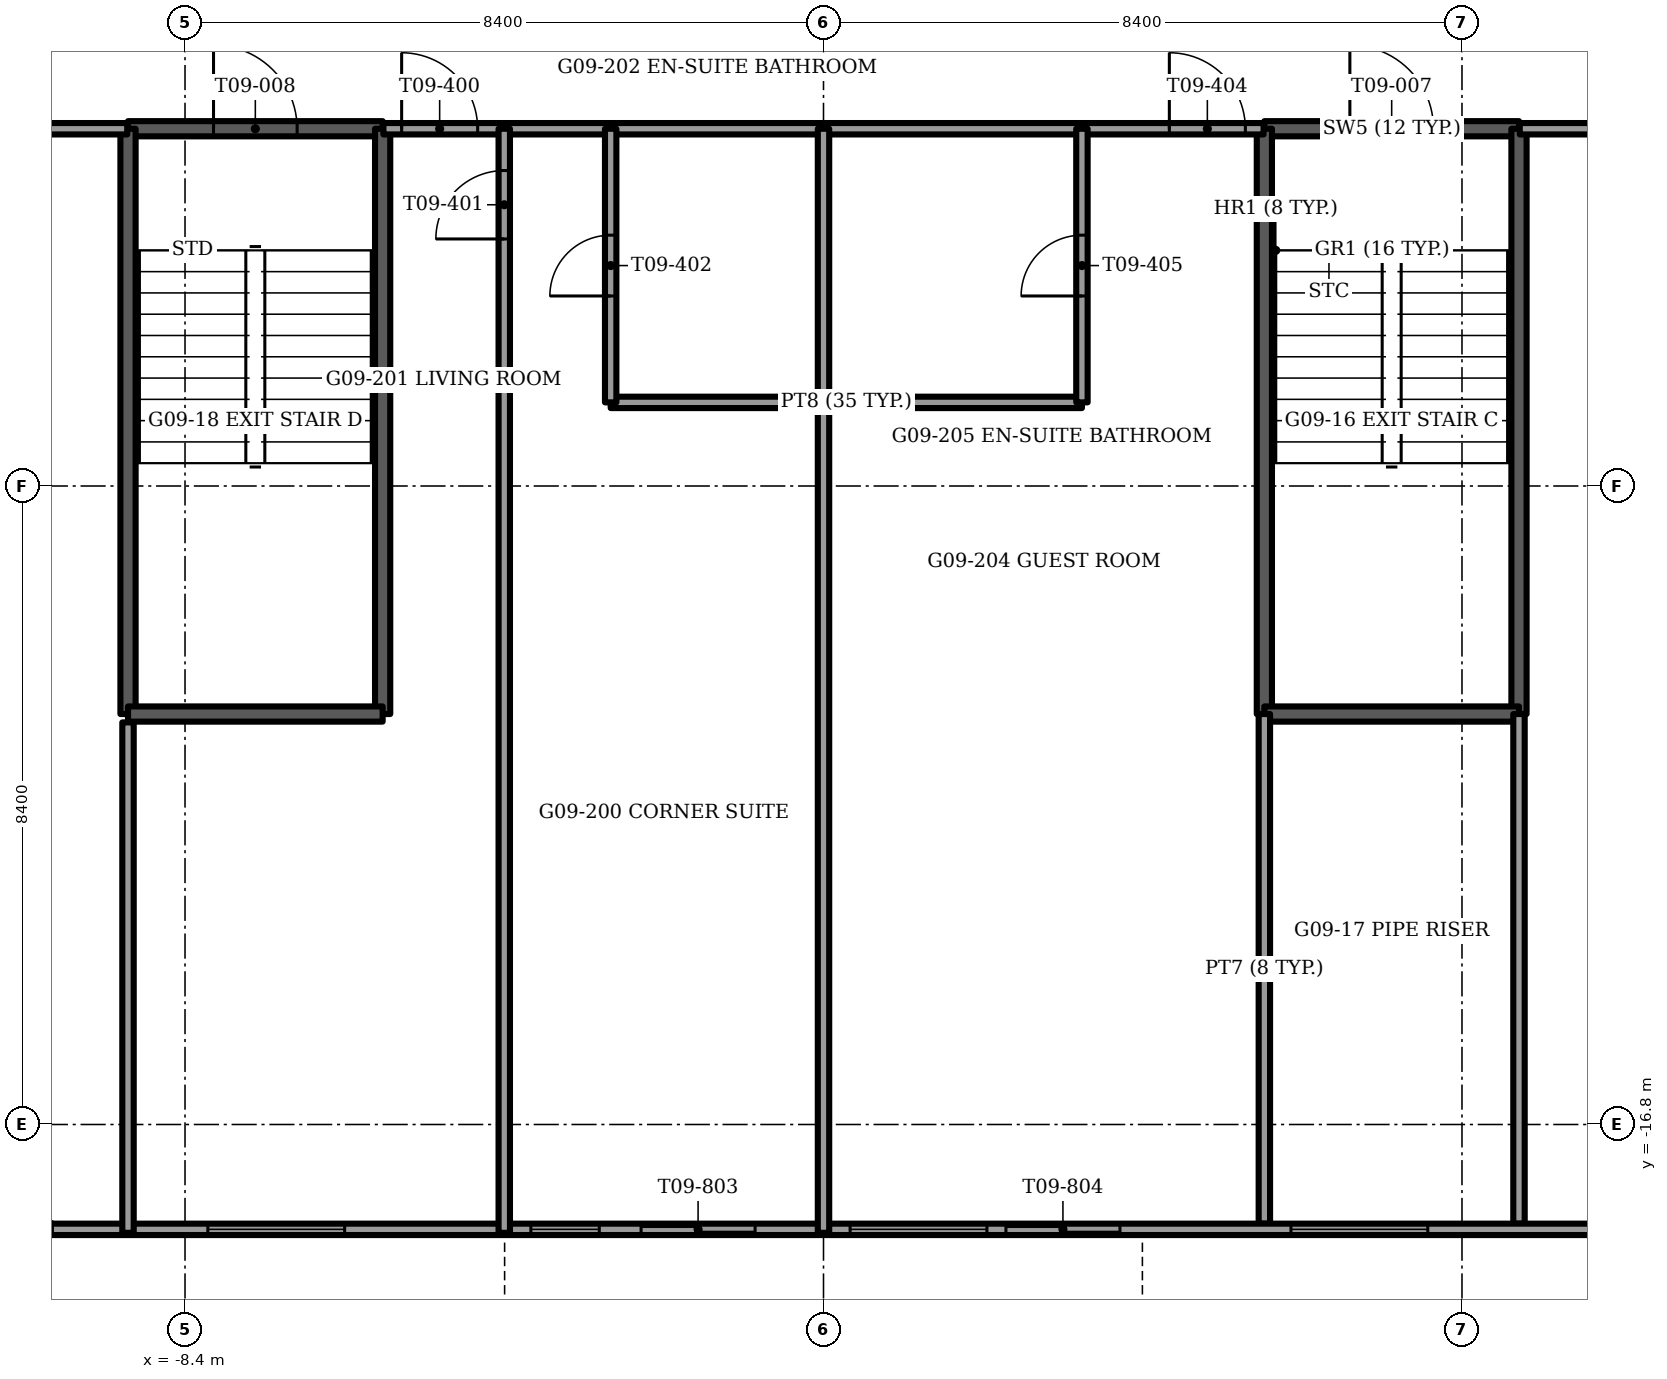
"""IFC4 building model, lengths in metres.
Left out: names, types, materials, properties, quantities, classifications, styles, units other than length and angle.
Written with IfcOpenShell. Run it as: python <this file> out.ifc"""

import sys

from ifc_helpers import new_model, si_unit, direction, frame, frame_2d, origin, place, context, subcontext, project, spatial, rectangle, extrude, element, fill, save


model = new_model("IFC4")
c1 = context("Model", 3, precision=1e-05, world=origin(), true_north=direction((0.0, 1.0)))
c2 = subcontext(c1, "Body", "Model", "MODEL_VIEW")
j1 = project(units=[si_unit("LENGTHUNIT", "METRE"), si_unit("PLANEANGLEUNIT", "RADIAN")], contexts=[c1])
p1 = place(None, origin())
s1 = spatial("IfcSite", under=j1, at=p1, CompositionType="ELEMENT")
p2 = place(p1, origin())
s2 = spatial("IfcBuilding", under=s1, at=p2, CompositionType="ELEMENT")
p3 = place(p2, frame((0.0, 0.0, 39.25)))
s3 = spatial("IfcBuildingStorey", under=s2, at=p3, CompositionType="ELEMENT", Elevation=39.25)
p4 = place(p3, frame((-10.165, -18.179, 0.0), z_axis=(0.0, 0.0, 1.0), x_axis=(1.0, 0.0, 0.0)))
e1 = element("IfcWall", 1, at=p4, inside=s3, PredefinedType="SOLIDWALL", context=c2, shape_type="SweptSolid", body=[
    extrude(rectangle(XDim=20.329, YDim=0.15, at=frame_2d((10.165, 0.0))), origin(), (0.0, 0.0, 1.0), 3.45),
])
p5 = place(p4, frame((2.064, 0.0, 0.15)))
e2 = element("IfcOpeningElement", 2, at=p5, cuts=e1, PredefinedType="OPENING", context=c2, shape_type="SweptSolid", body=[
    extrude(rectangle(XDim=1.8, YDim=2.85, at=frame_2d((0.9, 1.425))), frame((0.0, 0.075, 0.0), z_axis=(0.0, -1.0, 0.0), x_axis=(1.0, 0.0, 0.0)), (0.0, 0.0, 1.0), 0.15),
])
p6 = place(p4, frame((6.314, 0.0, 0.15)))
e3 = element("IfcOpeningElement", 3, at=p6, cuts=e1, PredefinedType="OPENING", context=c2, shape_type="SweptSolid", body=[
    extrude(rectangle(XDim=0.9, YDim=2.85, at=frame_2d((0.45, 1.425))), frame((0.0, 0.075, 0.0), z_axis=(0.0, -1.0, 0.0), x_axis=(1.0, 0.0, 0.0)), (0.0, 0.0, 1.0), 0.15),
])
p7 = place(p4, frame((7.764, 0.0, 0.0)))
e4 = element("IfcOpeningElement", 4, at=p7, cuts=e1, PredefinedType="OPENING", context=c2, shape_type="SweptSolid", body=[
    extrude(rectangle(XDim=1.5, YDim=2.4, at=frame_2d((0.75, 1.2))), frame((0.0, 0.075, 0.0), z_axis=(0.0, -1.0, 0.0), x_axis=(1.0, 0.0, 0.0)), (0.0, 0.0, 1.0), 0.15),
])
p8 = place(p4, frame((10.514, 0.0, 0.15)))
e5 = element("IfcOpeningElement", 5, at=p8, cuts=e1, PredefinedType="OPENING", context=c2, shape_type="SweptSolid", body=[
    extrude(rectangle(XDim=1.8, YDim=2.85, at=frame_2d((0.9, 1.425))), frame((0.0, 0.075, 0.0), z_axis=(0.0, -1.0, 0.0), x_axis=(1.0, 0.0, 0.0)), (0.0, 0.0, 1.0), 0.15),
])
p9 = place(p4, frame((12.564, 0.0, 0.0)))
e6 = element("IfcOpeningElement", 6, at=p9, cuts=e1, PredefinedType="OPENING", context=c2, shape_type="SweptSolid", body=[
    extrude(rectangle(XDim=1.5, YDim=2.4, at=frame_2d((0.75, 1.2))), frame((0.0, 0.075, 0.0), z_axis=(0.0, -1.0, 0.0), x_axis=(1.0, 0.0, 0.0)), (0.0, 0.0, 1.0), 0.15),
])
p10 = place(p4, frame((16.314, 0.0, 0.15)))
e7 = element("IfcOpeningElement", 7, at=p10, cuts=e1, PredefinedType="OPENING", context=c2, shape_type="SweptSolid", body=[
    extrude(rectangle(XDim=1.8, YDim=2.85, at=frame_2d((0.9, 1.425))), frame((0.0, 0.075, 0.0), z_axis=(0.0, -1.0, 0.0), x_axis=(1.0, 0.0, 0.0)), (0.0, 0.0, 1.0), 0.15),
])
p11 = place(p3, frame((-11.087, -17.647, 0.0), z_axis=(0.0, 0.0, 1.0), x_axis=(0.866048165231, -0.499960573946, 0.0)))
e8 = element("IfcWall", 8, at=p11, inside=s3, PredefinedType="SOLIDWALL", context=c2, shape_type="SweptSolid", body=[
    extrude(rectangle(XDim=1.065, YDim=0.15, at=frame_2d((0.532, 0.0))), origin(), (0.0, 0.0, 1.0), 3.45),
])
p12 = place(p11, frame((0.258, 0.0, 0.15)))
e9 = element("IfcOpeningElement", 9, at=p12, cuts=e8, PredefinedType="OPENING", context=c2, shape_type="SweptSolid", body=[
    extrude(rectangle(XDim=0.55, YDim=2.85, at=frame_2d((0.275, 1.425))), frame((0.0, 0.075, 0.0), z_axis=(0.0, -1.0, 0.0), x_axis=(1.0, 0.0, 0.0)), (0.0, 0.0, 1.0), 0.15),
])
p13 = place(p3, frame((5.8, -3.7, -0.3), z_axis=(0.0, 0.0, 1.0), x_axis=(1.0, 0.0, 0.0)))
e10 = element("IfcWall", 10, at=p13, inside=s3, PredefinedType="SOLIDWALL", context=c2, shape_type="SweptSolid", body=[
    extrude(rectangle(XDim=3.35, YDim=0.2, at=frame_2d((1.675, 0.0))), origin(), (0.0, 0.0, 1.0), 3.75),
])
p14 = place(p13, frame((1.125, 0.0, 0.0)))
e11 = element("IfcOpeningElement", 11, at=p14, cuts=e10, PredefinedType="OPENING", context=c2, shape_type="SweptSolid", body=[
    extrude(rectangle(XDim=1.1, YDim=2.1, at=frame_2d((0.55, 1.05))), frame((0.0, 0.1, 0.0), z_axis=(0.0, -1.0, 0.0), x_axis=(1.0, 0.0, 0.0)), (0.0, 0.0, 1.0), 0.2),
])
for number, where, z_axis, x_axis in (
    (12, (5.8, -3.7, -0.3), (0.0, 0.0, 1.0), (0.0, -1.0, 0.0)),
    (13, (9.15, -3.7, -0.3), (0.0, 0.0, 1.0), (0.0, -1.0, 0.0)),
):
    element("IfcWall", number, at=place(p3, frame(where, z_axis=z_axis, x_axis=x_axis)), inside=s3, PredefinedType="SOLIDWALL", context=c2, shape_type="SweptSolid", body=[
        extrude(rectangle(XDim=7.7, YDim=0.2, at=frame_2d((3.85, 0.0))), origin(), (0.0, 0.0, 1.0), 3.75),
    ])
p15 = place(p3, frame((5.8, -11.4, -0.3), z_axis=(0.0, 0.0, 1.0), x_axis=(1.0, 0.0, 0.0)))
e14 = element("IfcWall", 14, at=p15, inside=s3, PredefinedType="SOLIDWALL", context=c2, shape_type="SweptSolid", body=[
    extrude(rectangle(XDim=3.35, YDim=0.2, at=frame_2d((1.675, 0.0))), origin(), (0.0, 0.0, 1.0), 3.75),
])
for number, where, z_axis, x_axis in (
    (15, (5.8, -11.4, 0.0), (0.0, 0.0, 1.0), (0.0, -1.0, 0.0)),
    (16, (9.15, -11.4, 0.0), (0.0, 0.0, 1.0), (0.0, -1.0, 0.0)),
):
    element("IfcWall", number, at=place(p3, frame(where, z_axis=z_axis, x_axis=x_axis)), inside=s3, PredefinedType="PARTITIONING", context=c2, shape_type="SweptSolid", body=[
        extrude(rectangle(XDim=6.705, YDim=0.15, at=frame_2d((3.352, 0.0))), origin(), (0.0, 0.0, 1.0), 3.45),
    ])
p16 = place(p3, frame((-9.15, -3.7, -0.3), z_axis=(0.0, 0.0, 1.0), x_axis=(1.0, 0.0, 0.0)))
e17 = element("IfcWall", 17, at=p16, inside=s3, PredefinedType="SOLIDWALL", context=c2, shape_type="SweptSolid", body=[
    extrude(rectangle(XDim=3.35, YDim=0.2, at=frame_2d((1.675, 0.0))), origin(), (0.0, 0.0, 1.0), 3.75),
])
p17 = place(p16, frame((1.125, 0.0, 0.0)))
e18 = element("IfcOpeningElement", 18, at=p17, cuts=e17, PredefinedType="OPENING", context=c2, shape_type="SweptSolid", body=[
    extrude(rectangle(XDim=1.1, YDim=2.1, at=frame_2d((0.55, 1.05))), frame((0.0, 0.1, 0.0), z_axis=(0.0, -1.0, 0.0), x_axis=(1.0, 0.0, 0.0)), (0.0, 0.0, 1.0), 0.2),
])
for number, where, z_axis, x_axis in (
    (19, (-9.15, -3.7, -0.3), (0.0, 0.0, 1.0), (0.0, -1.0, 0.0)),
    (20, (-5.8, -3.7, -0.3), (0.0, 0.0, 1.0), (0.0, -1.0, 0.0)),
):
    element("IfcWall", number, at=place(p3, frame(where, z_axis=z_axis, x_axis=x_axis)), inside=s3, PredefinedType="SOLIDWALL", context=c2, shape_type="SweptSolid", body=[
        extrude(rectangle(XDim=7.7, YDim=0.2, at=frame_2d((3.85, 0.0))), origin(), (0.0, 0.0, 1.0), 3.75),
    ])
p18 = place(p3, frame((-9.15, -11.4, -0.3), z_axis=(0.0, 0.0, 1.0), x_axis=(1.0, 0.0, 0.0)))
e21 = element("IfcWall", 21, at=p18, inside=s3, PredefinedType="SOLIDWALL", context=c2, shape_type="SweptSolid", body=[
    extrude(rectangle(XDim=3.35, YDim=0.2, at=frame_2d((1.675, 0.0))), origin(), (0.0, 0.0, 1.0), 3.75),
])
p19 = place(p3, frame((-2.8, -7.3, 0.0), z_axis=(0.0, 0.0, 1.0), x_axis=(1.0, 0.0, 0.0)))
e22 = element("IfcWall", 22, at=p19, inside=s3, PredefinedType="PARTITIONING", context=c2, shape_type="SweptSolid", body=[
    extrude(rectangle(XDim=6.2, YDim=0.15, at=frame_2d((3.1, 0.0))), origin(), (0.0, 0.0, 1.0), 3.45),
])
p20 = place(p3, frame((-19.191, -3.7, 0.0), z_axis=(0.0, 0.0, 1.0), x_axis=(1.0, 0.0, 0.0)))
e23 = element("IfcWall", 23, at=p20, inside=s3, PredefinedType="PARTITIONING", context=c2, shape_type="SweptSolid", body=[
    extrude(rectangle(XDim=10.031, YDim=0.15, at=frame_2d((5.016, 0.0))), origin(), (0.0, 0.0, 1.0), 3.45),
])
p21 = place(p20, frame((7.191, 0.0, 0.0)))
e24 = element("IfcOpeningElement", 24, at=p21, cuts=e23, PredefinedType="OPENING", context=c2, shape_type="SweptSolid", body=[
    extrude(rectangle(XDim=1.0, YDim=2.1, at=frame_2d((0.5, 1.05))), frame((0.0, 0.075, 0.0), z_axis=(0.0, -1.0, 0.0), x_axis=(1.0, 0.0, 0.0)), (0.0, 0.0, 1.0), 0.15),
])
p22 = place(p3, frame((-5.79, -3.7, 0.0), z_axis=(0.0, 0.0, 1.0), x_axis=(1.0, 0.0, 0.0)))
e25 = element("IfcWall", 25, at=p22, inside=s3, PredefinedType="PARTITIONING", context=c2, shape_type="SweptSolid", body=[
    extrude(rectangle(XDim=11.58, YDim=0.15, at=frame_2d((5.79, 0.0))), origin(), (0.0, 0.0, 1.0), 3.45),
])
p23 = place(p22, frame((0.24, 0.0, 0.0)))
e26 = element("IfcOpeningElement", 26, at=p23, cuts=e25, PredefinedType="OPENING", context=c2, shape_type="SweptSolid", body=[
    extrude(rectangle(XDim=1.0, YDim=2.1, at=frame_2d((0.5, 1.05))), frame((0.0, 0.075, 0.0), z_axis=(0.0, -1.0, 0.0), x_axis=(1.0, 0.0, 0.0)), (0.0, 0.0, 1.0), 0.15),
])
p24 = place(p22, frame((10.34, 0.0, 0.0)))
e27 = element("IfcOpeningElement", 27, at=p24, cuts=e25, PredefinedType="OPENING", context=c2, shape_type="SweptSolid", body=[
    extrude(rectangle(XDim=1.0, YDim=2.1, at=frame_2d((0.5, 1.05))), frame((0.0, 0.075, 0.0), z_axis=(0.0, -1.0, 0.0), x_axis=(1.0, 0.0, 0.0)), (0.0, 0.0, 1.0), 0.15),
])
p25 = place(p3, frame((9.16, -3.7, 0.0), z_axis=(0.0, 0.0, 1.0), x_axis=(1.0, 0.0, 0.0)))
e28 = element("IfcWall", 28, at=p25, inside=s3, PredefinedType="PARTITIONING", context=c2, shape_type="SweptSolid", body=[
    extrude(rectangle(XDim=10.031, YDim=0.15, at=frame_2d((5.016, 0.0))), origin(), (0.0, 0.0, 1.0), 3.45),
])
p26 = place(p25, frame((1.84, 0.0, 0.0)))
e29 = element("IfcOpeningElement", 29, at=p26, cuts=e28, PredefinedType="OPENING", context=c2, shape_type="SweptSolid", body=[
    extrude(rectangle(XDim=1.0, YDim=2.1, at=frame_2d((0.5, 1.05))), frame((0.0, 0.075, 0.0), z_axis=(0.0, -1.0, 0.0), x_axis=(1.0, 0.0, 0.0)), (0.0, 0.0, 1.0), 0.15),
])
p27 = place(p3, frame((3.4, -7.3, 0.0), z_axis=(0.0, 0.0, 1.0), x_axis=(0.0, 1.0, 0.0)))
e30 = element("IfcWall", 30, at=p27, inside=s3, PredefinedType="PARTITIONING", context=c2, shape_type="SweptSolid", body=[
    extrude(rectangle(XDim=3.6, YDim=0.15, at=frame_2d((1.8, 0.0))), origin(), (0.0, 0.0, 1.0), 3.45),
])
p28 = place(p27, frame((1.4, 0.0, 0.0)))
e31 = element("IfcOpeningElement", 31, at=p28, cuts=e30, PredefinedType="OPENING", context=c2, shape_type="SweptSolid", body=[
    extrude(rectangle(XDim=0.8, YDim=2.1, at=frame_2d((0.4, 1.05))), frame((0.0, 0.075, 0.0), z_axis=(0.0, -1.0, 0.0), x_axis=(1.0, 0.0, 0.0)), (0.0, 0.0, 1.0), 0.15),
])
p29 = place(p3, frame((0.0, -18.225, 0.0), z_axis=(0.0, 0.0, 1.0), x_axis=(0.0, 1.0, 0.0)))
e32 = element("IfcWall", 32, at=p29, inside=s3, PredefinedType="PARTITIONING", context=c2, shape_type="SweptSolid", body=[
    extrude(rectangle(XDim=14.525, YDim=0.15, at=frame_2d((7.263, 0.0))), origin(), (0.0, 0.0, 1.0), 3.45),
])
p30 = place(p3, frame((-2.8, -7.3, 0.0), z_axis=(0.0, 0.0, 1.0), x_axis=(0.0, 1.0, 0.0)))
e33 = element("IfcWall", 33, at=p30, inside=s3, PredefinedType="PARTITIONING", context=c2, shape_type="SweptSolid", body=[
    extrude(rectangle(XDim=3.6, YDim=0.15, at=frame_2d((1.8, 0.0))), origin(), (0.0, 0.0, 1.0), 3.45),
])
p31 = place(p30, frame((1.4, 0.0, 0.0)))
e34 = element("IfcOpeningElement", 34, at=p31, cuts=e33, PredefinedType="OPENING", context=c2, shape_type="SweptSolid", body=[
    extrude(rectangle(XDim=0.8, YDim=2.1, at=frame_2d((0.4, 1.05))), frame((0.0, 0.075, 0.0), z_axis=(0.0, -1.0, 0.0), x_axis=(1.0, 0.0, 0.0)), (0.0, 0.0, 1.0), 0.15),
])
p32 = place(p3, frame((-4.2, -18.225, 0.0), z_axis=(0.0, 0.0, 1.0), x_axis=(0.0, 1.0, 0.0)))
e35 = element("IfcWall", 35, at=p32, inside=s3, PredefinedType="PARTITIONING", context=c2, shape_type="SweptSolid", body=[
    extrude(rectangle(XDim=14.525, YDim=0.15, at=frame_2d((7.263, 0.0))), origin(), (0.0, 0.0, 1.0), 3.45),
])
p33 = place(p32, frame((13.075, 0.0, 0.0)))
e36 = element("IfcOpeningElement", 36, at=p33, cuts=e35, PredefinedType="OPENING", context=c2, shape_type="SweptSolid", body=[
    extrude(rectangle(XDim=0.9, YDim=2.1, at=frame_2d((0.45, 1.05))), frame((0.0, 0.075, 0.0), z_axis=(0.0, -1.0, 0.0), x_axis=(1.0, 0.0, 0.0)), (0.0, 0.0, 1.0), 0.15),
])
p34 = place(p3, frame((-9.15, -18.225, 0.0), z_axis=(0.0, 0.0, 1.0), x_axis=(0.0, 1.0, 0.0)))
e37 = element("IfcWall", 37, at=p34, inside=s3, PredefinedType="PARTITIONING", context=c2, shape_type="SweptSolid", body=[
    extrude(rectangle(XDim=6.715, YDim=0.15, at=frame_2d((3.357, 0.0))), origin(), (0.0, 0.0, 1.0), 3.45),
])
p35 = place(p5, origin())
e38 = element("IfcWindow", 38, at=p35, inside=s3, PartitioningType="SINGLE_PANEL", PredefinedType="WINDOW", context=c2, shape_type="SweptSolid", body=[
    extrude(rectangle(XDim=1.8, YDim=2.85, at=frame_2d((0.9, 1.425))), frame((0.0, 0.03, 0.0), z_axis=(0.0, -1.0, 0.0), x_axis=(1.0, 0.0, 0.0)), (0.0, 0.0, 1.0), 0.06),
])
fill(e2, e38)
p36 = place(p6, origin())
e39 = element("IfcWindow", 39, at=p36, inside=s3, PartitioningType="SINGLE_PANEL", PredefinedType="WINDOW", context=c2, shape_type="SweptSolid", body=[
    extrude(rectangle(XDim=0.9, YDim=2.85, at=frame_2d((0.45, 1.425))), frame((0.0, 0.03, 0.0), z_axis=(0.0, -1.0, 0.0), x_axis=(1.0, 0.0, 0.0)), (0.0, 0.0, 1.0), 0.06),
])
fill(e3, e39)
p37 = place(p7, origin())
e40 = element("IfcDoor", 40, at=p37, inside=s3, OperationType="SLIDING_TO_RIGHT", PredefinedType="DOOR", context=c2, shape_type="SweptSolid", body=[
    extrude(rectangle(XDim=1.5, YDim=2.4, at=frame_2d((0.75, 1.2))), frame((0.0, 0.025, 0.0), z_axis=(0.0, -1.0, 0.0), x_axis=(1.0, 0.0, 0.0)), (0.0, 0.0, 1.0), 0.05),
])
fill(e4, e40)
p38 = place(p8, origin())
e41 = element("IfcWindow", 41, at=p38, inside=s3, PartitioningType="SINGLE_PANEL", PredefinedType="WINDOW", context=c2, shape_type="SweptSolid", body=[
    extrude(rectangle(XDim=1.8, YDim=2.85, at=frame_2d((0.9, 1.425))), frame((0.0, 0.03, 0.0), z_axis=(0.0, -1.0, 0.0), x_axis=(1.0, 0.0, 0.0)), (0.0, 0.0, 1.0), 0.06),
])
fill(e5, e41)
p39 = place(p9, origin())
e42 = element("IfcDoor", 42, at=p39, inside=s3, OperationType="SLIDING_TO_LEFT", PredefinedType="DOOR", context=c2, shape_type="SweptSolid", body=[
    extrude(rectangle(XDim=1.5, YDim=2.4, at=frame_2d((0.75, 1.2))), frame((0.0, 0.025, 0.0), z_axis=(0.0, -1.0, 0.0), x_axis=(1.0, 0.0, 0.0)), (0.0, 0.0, 1.0), 0.05),
])
fill(e6, e42)
p40 = place(p10, origin())
e43 = element("IfcWindow", 43, at=p40, inside=s3, PartitioningType="SINGLE_PANEL", PredefinedType="WINDOW", context=c2, shape_type="SweptSolid", body=[
    extrude(rectangle(XDim=1.8, YDim=2.85, at=frame_2d((0.9, 1.425))), frame((0.0, 0.03, 0.0), z_axis=(0.0, -1.0, 0.0), x_axis=(1.0, 0.0, 0.0)), (0.0, 0.0, 1.0), 0.06),
])
fill(e7, e43)
p41 = place(p14, origin())
e44 = element("IfcDoor", 44, at=p41, inside=s3, OperationType="SINGLE_SWING_LEFT", PredefinedType="DOOR", context=c2, shape_type="SweptSolid", body=[
    extrude(rectangle(XDim=1.1, YDim=2.1, at=frame_2d((0.55, 1.05))), frame((0.0, 0.025, 0.0), z_axis=(0.0, -1.0, 0.0), x_axis=(1.0, 0.0, 0.0)), (0.0, 0.0, 1.0), 0.05),
])
fill(e11, e44)
p42 = place(p17, origin())
e45 = element("IfcDoor", 45, at=p42, inside=s3, OperationType="SINGLE_SWING_LEFT", PredefinedType="DOOR", context=c2, shape_type="SweptSolid", body=[
    extrude(rectangle(XDim=1.1, YDim=2.1, at=frame_2d((0.55, 1.05))), frame((0.0, 0.025, 0.0), z_axis=(0.0, -1.0, 0.0), x_axis=(1.0, 0.0, 0.0)), (0.0, 0.0, 1.0), 0.05),
])
fill(e18, e45)
p43 = place(p23, origin())
e46 = element("IfcDoor", 46, at=p43, inside=s3, OperationType="SINGLE_SWING_LEFT", PredefinedType="DOOR", context=c2, shape_type="SweptSolid", body=[
    extrude(rectangle(XDim=1.0, YDim=2.1, at=frame_2d((0.5, 1.05))), frame((0.0, 0.025, 0.0), z_axis=(0.0, -1.0, 0.0), x_axis=(1.0, 0.0, 0.0)), (0.0, 0.0, 1.0), 0.05),
])
fill(e26, e46)
p44 = place(p33, origin())
e47 = element("IfcDoor", 47, at=p44, inside=s3, OperationType="SINGLE_SWING_RIGHT", PredefinedType="DOOR", context=c2, shape_type="SweptSolid", body=[
    extrude(rectangle(XDim=0.9, YDim=2.1, at=frame_2d((0.45, 1.05))), frame((0.0, 0.025, 0.0), z_axis=(0.0, -1.0, 0.0), x_axis=(1.0, 0.0, 0.0)), (0.0, 0.0, 1.0), 0.05),
])
fill(e36, e47)
p45 = place(p31, origin())
e48 = element("IfcDoor", 48, at=p45, inside=s3, OperationType="SINGLE_SWING_RIGHT", PredefinedType="DOOR", context=c2, shape_type="SweptSolid", body=[
    extrude(rectangle(XDim=0.8, YDim=2.1, at=frame_2d((0.4, 1.05))), frame((0.0, 0.025, 0.0), z_axis=(0.0, -1.0, 0.0), x_axis=(1.0, 0.0, 0.0)), (0.0, 0.0, 1.0), 0.05),
])
fill(e34, e48)
p46 = place(p24, origin())
e49 = element("IfcDoor", 49, at=p46, inside=s3, OperationType="SINGLE_SWING_RIGHT", PredefinedType="DOOR", context=c2, shape_type="SweptSolid", body=[
    extrude(rectangle(XDim=1.0, YDim=2.1, at=frame_2d((0.5, 1.05))), frame((0.0, 0.025, 0.0), z_axis=(0.0, -1.0, 0.0), x_axis=(1.0, 0.0, 0.0)), (0.0, 0.0, 1.0), 0.05),
])
fill(e27, e49)
p47 = place(p28, origin())
e50 = element("IfcDoor", 50, at=p47, inside=s3, OperationType="SINGLE_SWING_RIGHT", PredefinedType="DOOR", context=c2, shape_type="SweptSolid", body=[
    extrude(rectangle(XDim=0.8, YDim=2.1, at=frame_2d((0.4, 1.05))), frame((0.0, 0.025, 0.0), z_axis=(0.0, -1.0, 0.0), x_axis=(1.0, 0.0, 0.0)), (0.0, 0.0, 1.0), 0.05),
])
fill(e31, e50)
save(model, sys.argv[1])
